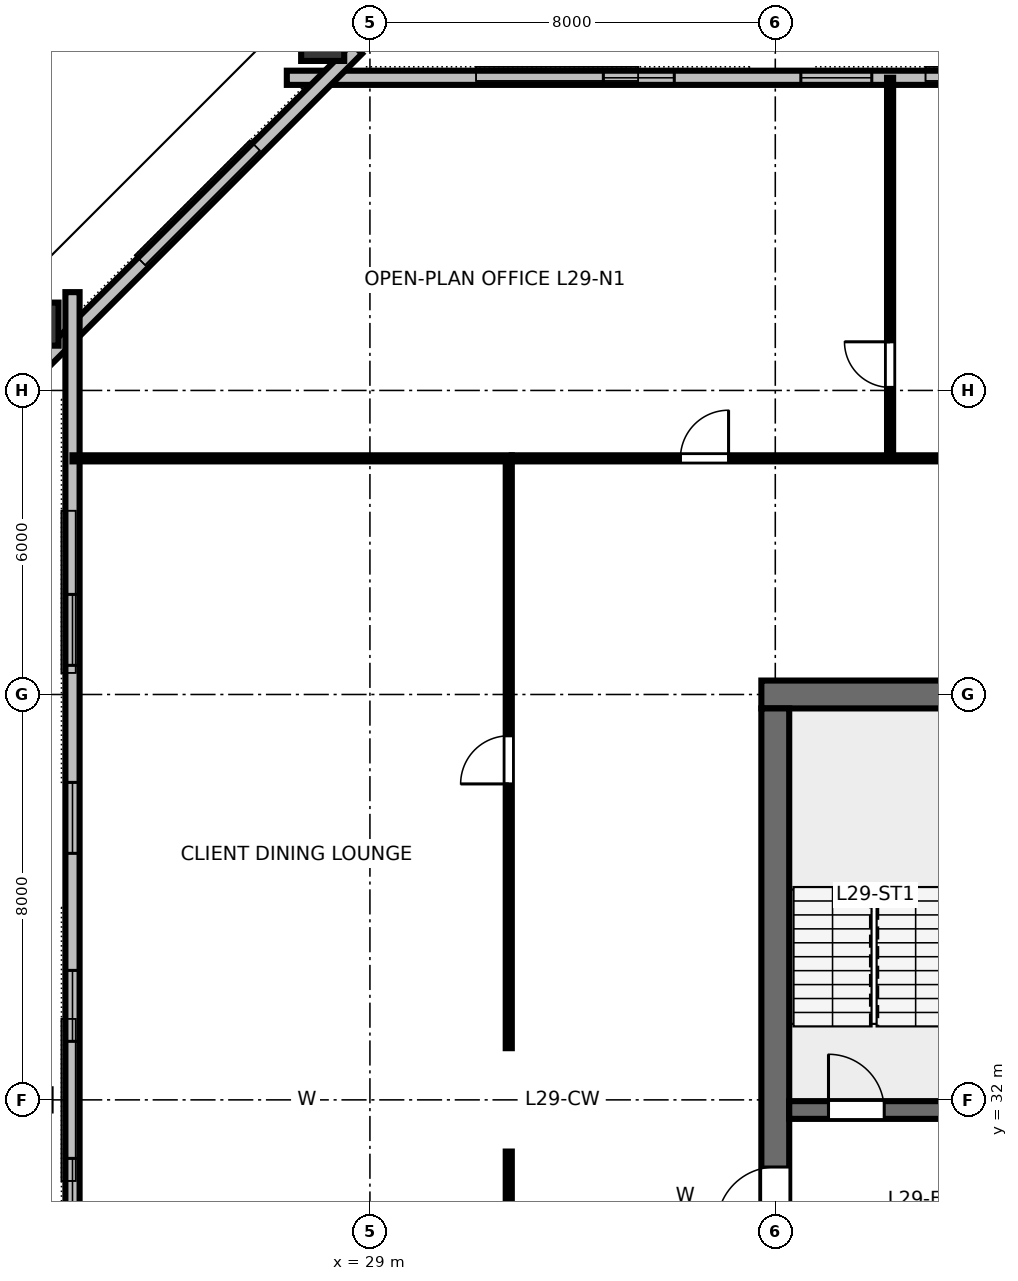
"""IFC4 building model, lengths in metres.
Left out: names, types, materials, properties, quantities, classifications, styles, units other than length and angle.
Written with IfcOpenShell. Run it as: python <this file> out.ifc"""

import sys

from ifc_helpers import new_model, si_unit, direction, frame, frame_2d, origin, origin_2d, place, context, subcontext, project, spatial, rectangle, hollow_rectangle, i_section, extrude, element, fill, save


model = new_model("IFC4")
c1 = context("Model", 3, precision=1e-05, world=origin(), true_north=direction((0.0, 1.0)))
c2 = subcontext(c1, "Body", "Model", "MODEL_VIEW")
j1 = project(units=[si_unit("LENGTHUNIT", "METRE"), si_unit("PLANEANGLEUNIT", "RADIAN")], contexts=[c1])
p1 = place(None, origin())
s1 = spatial("IfcSite", under=j1, at=p1, CompositionType="ELEMENT")
p2 = place(p1, origin())
s2 = spatial("IfcBuilding", under=s1, at=p2, CompositionType="ELEMENT")
p3 = place(p2, frame((0.0, 0.0, 113.2)))
s3 = spatial("IfcBuildingStorey", under=s2, at=p3, CompositionType="ELEMENT", Elevation=113.2)
p4 = place(p3, frame((36.725, 40.0, 0.0), z_axis=(0.0, 0.0, 1.0), x_axis=(1.0, 0.0, 0.0)))
e1 = element("IfcWall", 1, at=p4, inside=s3, PredefinedType="SHEAR", context=c2, shape_type="SweptSolid", body=[
    extrude(rectangle(XDim=18.55, YDim=0.55, at=frame_2d((9.275, 0.0))), origin(), (0.0, 0.0, 1.0), 3.36),
])
p5 = place(p4, frame((10.575, 0.0, 0.0)))
e2 = element("IfcOpeningElement", 2, at=p5, cuts=e1, PredefinedType="OPENING", context=c2, shape_type="SweptSolid", body=[
    extrude(rectangle(XDim=1.0, YDim=2.15, at=frame_2d((0.5, 1.075))), frame((0.0, 0.285, 0.0), z_axis=(0.0, -1.0, 0.0), x_axis=(1.0, 0.0, 0.0)), (0.0, 0.0, 1.0), 0.57),
])
p6 = place(p3, frame((37.0, 24.275, 0.0), z_axis=(0.0, 0.0, 1.0), x_axis=(0.0, 1.0, 0.0)))
e3 = element("IfcWall", 3, at=p6, inside=s3, PredefinedType="SHEAR", context=c2, shape_type="SweptSolid", body=[
    extrude(rectangle(XDim=15.45, YDim=0.55, at=frame_2d((7.725, 0.0))), origin(), (0.0, 0.0, 1.0), 3.36),
])
p7 = place(p6, frame((5.25, 0.0, 0.0)))
e4 = element("IfcOpeningElement", 4, at=p7, cuts=e3, PredefinedType="OPENING", context=c2, shape_type="SweptSolid", body=[
    extrude(rectangle(XDim=1.15, YDim=2.15, at=frame_2d((0.575, 1.075))), frame((0.0, 0.285, 0.0), z_axis=(0.0, -1.0, 0.0), x_axis=(1.0, 0.0, 0.0)), (0.0, 0.0, 1.0), 0.57),
])
p8 = place(p3, frame((37.275, 31.8, 0.0), z_axis=(0.0, 0.0, 1.0), x_axis=(1.0, 0.0, 0.0)))
e5 = element("IfcWall", 5, at=p8, inside=s3, PredefinedType="SHEAR", context=c2, shape_type="SweptSolid", body=[
    extrude(rectangle(XDim=17.45, YDim=0.35, at=frame_2d((8.725, 0.0))), origin(), (0.0, 0.0, 1.0), 3.36),
])
p9 = place(p8, frame((0.775, 0.0, 0.0)))
e6 = element("IfcOpeningElement", 6, at=p9, cuts=e5, PredefinedType="OPENING", context=c2, shape_type="SweptSolid", body=[
    extrude(rectangle(XDim=1.1, YDim=2.15, at=frame_2d((0.55, 1.075))), frame((0.0, 0.185, 0.0), z_axis=(0.0, -1.0, 0.0), x_axis=(1.0, 0.0, 0.0)), (0.0, 0.0, 1.0), 0.37),
])
p10 = place(p8, frame((14.675, 0.0, 0.0)))
e7 = element("IfcOpeningElement", 7, at=p10, cuts=e5, PredefinedType="OPENING", context=c2, shape_type="SweptSolid", body=[
    extrude(rectangle(XDim=1.1, YDim=2.15, at=frame_2d((0.55, 1.075))), frame((0.0, 0.185, 0.0), z_axis=(0.0, -1.0, 0.0), x_axis=(1.0, 0.0, 0.0)), (0.0, 0.0, 1.0), 0.37),
])
p11 = place(p3, frame((28.067, 53.002, 0.0), z_axis=(0.227500403072, -0.158558770333, 0.960782328601), x_axis=(0.571787524267, 0.820401747373, 0.0)))
e8 = element("IfcColumn", 8, at=p11, inside=s3, PredefinedType="COLUMN", context=c2, shape_type="SweptSolid", body=[
    extrude(hollow_rectangle(XDim=0.85, YDim=1.0, WallThickness=0.05, at=origin_2d()), origin(), (0.0, 0.0, 1.0), 3.495),
])
p12 = place(p3, frame((22.354, 47.309, 0.0), z_axis=(0.187078780285, -0.199037835024, 0.961969578623), x_axis=(-0.658831210424, 0.700947149483, 0.273156603076)))
e9 = element("IfcColumn", 9, at=p12, inside=s3, PredefinedType="COLUMN", context=c2, shape_type="SweptSolid", body=[
    extrude(hollow_rectangle(XDim=0.85, YDim=1.0, WallThickness=0.05, at=origin_2d()), origin(), (0.0, 0.0, 1.0), 3.491),
])
p13 = place(p3, frame((22.47, 32.0, 0.0), z_axis=(0.19007295017, 0.0, 0.981769969806), x_axis=(-0.981769969806, 0.0, 0.19007295017)))
e10 = element("IfcColumn", 10, at=p13, inside=s3, PredefinedType="COLUMN", context=c2, shape_type="SweptSolid", body=[
    extrude(i_section(OverallWidth=0.418, OverallDepth=0.455, WebThickness=0.042, FlangeThickness=0.068, FilletRadius=0.025, at=origin_2d()), origin(), (0.0, 0.0, 1.0), 3.42),
])
p14 = place(p3, frame((64.64, 52.17, 0.0), z_axis=(0.0, 0.0, 1.0), x_axis=(-1.0, 0.0, 0.0)))
e11 = element("IfcWall", 11, at=p14, inside=s3, PredefinedType="STANDARD", context=c2, shape_type="SweptSolid", body=[
    extrude(rectangle(XDim=37.28, YDim=0.28, at=frame_2d((18.64, 0.0))), origin(), (0.0, 0.0, 1.0), 2.662),
])
p15 = place(p14, frame((15.347, 0.0, 0.0)))
e12 = element("IfcOpeningElement", 12, at=p15, cuts=e11, PredefinedType="OPENING", context=c2, shape_type="SweptSolid", body=[
    extrude(rectangle(XDim=1.4, YDim=2.15, at=frame_2d((0.7, 1.075))), frame((0.0, 0.15, 0.0), z_axis=(0.0, -1.0, 0.0), x_axis=(1.0, 0.0, 0.0)), (0.0, 0.0, 1.0), 0.3),
])
p16 = place(p14, frame((6.247, 0.0, 0.85)))
e13 = element("IfcOpeningElement", 13, at=p16, cuts=e11, PredefinedType="OPENING", context=c2, shape_type="SweptSolid", body=[
    extrude(rectangle(XDim=1.4, YDim=1.2, at=frame_2d((0.7, 0.6))), frame((0.0, 0.15, 0.0), z_axis=(0.0, -1.0, 0.0), x_axis=(1.0, 0.0, 0.0)), (0.0, 0.0, 1.0), 0.3),
])
p17 = place(p14, frame((21.838, 0.0, 0.85)))
e14 = element("IfcOpeningElement", 14, at=p17, cuts=e11, PredefinedType="OPENING", context=c2, shape_type="SweptSolid", body=[
    extrude(rectangle(XDim=1.4, YDim=1.2, at=frame_2d((0.7, 0.6))), frame((0.0, 0.15, 0.0), z_axis=(0.0, -1.0, 0.0), x_axis=(1.0, 0.0, 0.0)), (0.0, 0.0, 1.0), 0.3),
])
p18 = place(p14, frame((25.736, 0.0, 0.85)))
e15 = element("IfcOpeningElement", 15, at=p18, cuts=e11, PredefinedType="OPENING", context=c2, shape_type="SweptSolid", body=[
    extrude(rectangle(XDim=1.4, YDim=1.2, at=frame_2d((0.7, 0.6))), frame((0.0, 0.15, 0.0), z_axis=(0.0, -1.0, 0.0), x_axis=(1.0, 0.0, 0.0)), (0.0, 0.0, 1.0), 0.3),
])
p19 = place(p14, frame((29.633, 0.0, 0.85)))
e16 = element("IfcOpeningElement", 16, at=p19, cuts=e11, PredefinedType="OPENING", context=c2, shape_type="SweptSolid", body=[
    extrude(rectangle(XDim=1.4, YDim=1.2, at=frame_2d((0.7, 0.6))), frame((0.0, 0.15, 0.0), z_axis=(0.0, -1.0, 0.0), x_axis=(1.0, 0.0, 0.0)), (0.0, 0.0, 1.0), 0.3),
])
p20 = place(p3, frame((28.746, 52.744, 0.0), z_axis=(0.0, 0.0, 1.0), x_axis=(-0.707106781187, -0.707106781187, 0.0)))
e17 = element("IfcWall", 17, at=p20, inside=s3, PredefinedType="STANDARD", context=c2, shape_type="SweptSolid", body=[
    extrude(rectangle(XDim=8.753, YDim=0.28, at=frame_2d((4.376, 0.0))), origin(), (0.0, 0.0, 1.0), 2.662),
])
p21 = place(p3, frame((23.13, 47.94, 0.0), z_axis=(0.0, 0.0, 1.0), x_axis=(0.0, -1.0, 0.0)))
e18 = element("IfcWall", 18, at=p21, inside=s3, PredefinedType="STANDARD", context=c2, shape_type="SweptSolid", body=[
    extrude(rectangle(XDim=31.88, YDim=0.28, at=frame_2d((15.94, 0.0))), origin(), (0.0, 0.0, 1.0), 2.662),
])
p22 = place(p21, frame((5.965, 0.0, 0.85)))
e19 = element("IfcOpeningElement", 19, at=p22, cuts=e18, PredefinedType="OPENING", context=c2, shape_type="SweptSolid", body=[
    extrude(rectangle(XDim=1.4, YDim=1.2, at=frame_2d((0.7, 0.6))), frame((0.0, 0.15, 0.0), z_axis=(0.0, -1.0, 0.0), x_axis=(1.0, 0.0, 0.0)), (0.0, 0.0, 1.0), 0.3),
])
p23 = place(p21, frame((9.675, 0.0, 0.85)))
e20 = element("IfcOpeningElement", 20, at=p23, cuts=e18, PredefinedType="OPENING", context=c2, shape_type="SweptSolid", body=[
    extrude(rectangle(XDim=1.4, YDim=1.2, at=frame_2d((0.7, 0.6))), frame((0.0, 0.15, 0.0), z_axis=(0.0, -1.0, 0.0), x_axis=(1.0, 0.0, 0.0)), (0.0, 0.0, 1.0), 0.3),
])
p24 = place(p21, frame((13.385, 0.0, 0.85)))
e21 = element("IfcOpeningElement", 21, at=p24, cuts=e18, PredefinedType="OPENING", context=c2, shape_type="SweptSolid", body=[
    extrude(rectangle(XDim=1.4, YDim=1.2, at=frame_2d((0.7, 0.6))), frame((0.0, 0.15, 0.0), z_axis=(0.0, -1.0, 0.0), x_axis=(1.0, 0.0, 0.0)), (0.0, 0.0, 1.0), 0.3),
])
p25 = place(p21, frame((17.095, 0.0, 0.85)))
e22 = element("IfcOpeningElement", 22, at=p25, cuts=e18, PredefinedType="OPENING", context=c2, shape_type="SweptSolid", body=[
    extrude(rectangle(XDim=1.4, YDim=1.2, at=frame_2d((0.7, 0.6))), frame((0.0, 0.15, 0.0), z_axis=(0.0, -1.0, 0.0), x_axis=(1.0, 0.0, 0.0)), (0.0, 0.0, 1.0), 0.3),
])
p26 = place(p21, frame((20.805, 0.0, 0.85)))
e23 = element("IfcOpeningElement", 23, at=p26, cuts=e18, PredefinedType="OPENING", context=c2, shape_type="SweptSolid", body=[
    extrude(rectangle(XDim=1.4, YDim=1.2, at=frame_2d((0.7, 0.6))), frame((0.0, 0.15, 0.0), z_axis=(0.0, -1.0, 0.0), x_axis=(1.0, 0.0, 0.0)), (0.0, 0.0, 1.0), 0.3),
])
p27 = place(p21, frame((24.515, 0.0, 0.85)))
e24 = element("IfcOpeningElement", 24, at=p27, cuts=e18, PredefinedType="OPENING", context=c2, shape_type="SweptSolid", body=[
    extrude(rectangle(XDim=1.4, YDim=1.2, at=frame_2d((0.7, 0.6))), frame((0.0, 0.15, 0.0), z_axis=(0.0, -1.0, 0.0), x_axis=(1.0, 0.0, 0.0)), (0.0, 0.0, 1.0), 0.3),
])
p28 = place(p3, frame((39.266, 44.66, 0.0), z_axis=(0.0, 0.0, 1.0), x_axis=(0.0, 1.0, 0.0)))
e25 = element("IfcWall", 25, at=p28, inside=s3, PredefinedType="PARTITIONING", context=c2, shape_type="SweptSolid", body=[
    extrude(rectangle(XDim=7.51, YDim=0.12, at=frame_2d((3.755, 0.0))), origin(), (0.0, 0.0, 1.0), 2.64),
])
p29 = place(p28, frame((1.4, 0.0, 0.0)))
e26 = element("IfcOpeningElement", 26, at=p29, cuts=e25, PredefinedType="OPENING", context=c2, shape_type="SweptSolid", body=[
    extrude(rectangle(XDim=0.9, YDim=2.15, at=frame_2d((0.45, 1.075))), frame((0.0, 0.07, 0.0), z_axis=(0.0, -1.0, 0.0), x_axis=(1.0, 0.0, 0.0)), (0.0, 0.0, 1.0), 0.14),
])
p30 = place(p3, frame((31.8, 44.66, 0.0), z_axis=(0.0, 0.0, 1.0), x_axis=(1.0, 0.0, 0.0)))
e27 = element("IfcWall", 27, at=p30, inside=s3, PredefinedType="PARTITIONING", context=c2, shape_type="SweptSolid", body=[
    extrude(rectangle(XDim=28.4, YDim=0.12, at=frame_2d((14.2, 0.0))), origin(), (0.0, 0.0, 1.0), 2.64),
])
p31 = place(p30, frame((3.328, 0.0, 0.0)))
e28 = element("IfcOpeningElement", 28, at=p31, cuts=e27, PredefinedType="OPENING", context=c2, shape_type="SweptSolid", body=[
    extrude(rectangle(XDim=0.95, YDim=2.15, at=frame_2d((0.475, 1.075))), frame((0.0, 0.07, 0.0), z_axis=(0.0, -1.0, 0.0), x_axis=(1.0, 0.0, 0.0)), (0.0, 0.0, 1.0), 0.14),
])
p32 = place(p30, frame((8.901, 0.0, 0.0)))
e29 = element("IfcOpeningElement", 29, at=p32, cuts=e27, PredefinedType="OPENING", context=c2, shape_type="SweptSolid", body=[
    extrude(rectangle(XDim=0.95, YDim=2.15, at=frame_2d((0.475, 1.075))), frame((0.0, 0.07, 0.0), z_axis=(0.0, -1.0, 0.0), x_axis=(1.0, 0.0, 0.0)), (0.0, 0.0, 1.0), 0.14),
])
p33 = place(p30, frame((14.127, 0.0, 0.0)))
e30 = element("IfcOpeningElement", 30, at=p33, cuts=e27, PredefinedType="OPENING", context=c2, shape_type="SweptSolid", body=[
    extrude(rectangle(XDim=0.95, YDim=2.15, at=frame_2d((0.475, 1.075))), frame((0.0, 0.07, 0.0), z_axis=(0.0, -1.0, 0.0), x_axis=(1.0, 0.0, 0.0)), (0.0, 0.0, 1.0), 0.14),
])
p34 = place(p30, frame((19.537, 0.0, 0.0)))
e31 = element("IfcOpeningElement", 31, at=p34, cuts=e27, PredefinedType="OPENING", context=c2, shape_type="SweptSolid", body=[
    extrude(rectangle(XDim=0.95, YDim=2.15, at=frame_2d((0.475, 1.075))), frame((0.0, 0.07, 0.0), z_axis=(0.0, -1.0, 0.0), x_axis=(1.0, 0.0, 0.0)), (0.0, 0.0, 1.0), 0.14),
])
p35 = place(p30, frame((24.708, 0.0, 0.0)))
e32 = element("IfcOpeningElement", 32, at=p35, cuts=e27, PredefinedType="OPENING", context=c2, shape_type="SweptSolid", body=[
    extrude(rectangle(XDim=0.95, YDim=2.15, at=frame_2d((0.475, 1.075))), frame((0.0, 0.07, 0.0), z_axis=(0.0, -1.0, 0.0), x_axis=(1.0, 0.0, 0.0)), (0.0, 0.0, 1.0), 0.14),
])
p36 = place(p3, frame((31.74, 19.4, 0.0), z_axis=(0.0, 0.0, 1.0), x_axis=(0.0, 1.0, 0.0)))
e33 = element("IfcWall", 33, at=p36, inside=s3, PredefinedType="PARTITIONING", context=c2, shape_type="SweptSolid", body=[
    extrude(rectangle(XDim=11.58, YDim=0.12, at=frame_2d((5.79, 0.0))), origin(), (0.0, 0.0, 1.0), 2.64),
])
p37 = place(p36, frame((5.415, 0.0, 0.0)))
e34 = element("IfcOpeningElement", 34, at=p37, cuts=e33, PredefinedType="OPENING", context=c2, shape_type="SweptSolid", body=[
    extrude(rectangle(XDim=0.95, YDim=2.15, at=frame_2d((0.475, 1.075))), frame((0.0, 0.07, 0.0), z_axis=(0.0, -1.0, 0.0), x_axis=(1.0, 0.0, 0.0)), (0.0, 0.0, 1.0), 0.14),
])
p38 = place(p3, frame((31.74, 33.02, 0.0), z_axis=(0.0, 0.0, 1.0), x_axis=(0.0, 1.0, 0.0)))
e35 = element("IfcWall", 35, at=p38, inside=s3, PredefinedType="PARTITIONING", context=c2, shape_type="SweptSolid", body=[
    extrude(rectangle(XDim=11.58, YDim=0.12, at=frame_2d((5.79, 0.0))), origin(), (0.0, 0.0, 1.0), 2.64),
])
p39 = place(p38, frame((5.215, 0.0, 0.0)))
e36 = element("IfcOpeningElement", 36, at=p39, cuts=e35, PredefinedType="OPENING", context=c2, shape_type="SweptSolid", body=[
    extrude(rectangle(XDim=0.95, YDim=2.15, at=frame_2d((0.475, 1.075))), frame((0.0, 0.07, 0.0), z_axis=(0.0, -1.0, 0.0), x_axis=(1.0, 0.0, 0.0)), (0.0, 0.0, 1.0), 0.14),
])
p40 = place(p3, frame((31.8, 44.66, 0.0), z_axis=(0.0, 0.0, 1.0), x_axis=(-1.0, 0.0, 0.0)))
e37 = element("IfcWall", 37, at=p40, inside=s3, PredefinedType="PARTITIONING", context=c2, shape_type="SweptSolid", body=[
    extrude(rectangle(XDim=8.67, YDim=0.12, at=frame_2d((4.335, 0.0))), origin(), (0.0, 0.0, 1.0), 2.64),
])
p41 = place(p18, origin())
e38 = element("IfcWindow", 38, at=p41, inside=s3, PartitioningType="SINGLE_PANEL", PredefinedType="WINDOW", context=c2, shape_type="SweptSolid", body=[
    extrude(rectangle(XDim=1.4, YDim=1.2, at=frame_2d((0.7, 0.6))), frame((0.0, 0.03, 0.0), z_axis=(0.0, -1.0, 0.0), x_axis=(1.0, 0.0, 0.0)), (0.0, 0.0, 1.0), 0.06),
])
fill(e15, e38)
p42 = place(p19, origin())
e39 = element("IfcWindow", 39, at=p42, inside=s3, PartitioningType="SINGLE_PANEL", PredefinedType="WINDOW", context=c2, shape_type="SweptSolid", body=[
    extrude(rectangle(XDim=1.4, YDim=1.2, at=frame_2d((0.7, 0.6))), frame((0.0, 0.03, 0.0), z_axis=(0.0, -1.0, 0.0), x_axis=(1.0, 0.0, 0.0)), (0.0, 0.0, 1.0), 0.06),
])
fill(e16, e39)
p43 = place(p22, origin())
e40 = element("IfcWindow", 40, at=p43, inside=s3, PartitioningType="SINGLE_PANEL", PredefinedType="WINDOW", context=c2, shape_type="SweptSolid", body=[
    extrude(rectangle(XDim=1.4, YDim=1.2, at=frame_2d((0.7, 0.6))), frame((0.0, 0.03, 0.0), z_axis=(0.0, -1.0, 0.0), x_axis=(1.0, 0.0, 0.0)), (0.0, 0.0, 1.0), 0.06),
])
fill(e19, e40)
p44 = place(p23, origin())
e41 = element("IfcWindow", 41, at=p44, inside=s3, PartitioningType="SINGLE_PANEL", PredefinedType="WINDOW", context=c2, shape_type="SweptSolid", body=[
    extrude(rectangle(XDim=1.4, YDim=1.2, at=frame_2d((0.7, 0.6))), frame((0.0, 0.03, 0.0), z_axis=(0.0, -1.0, 0.0), x_axis=(1.0, 0.0, 0.0)), (0.0, 0.0, 1.0), 0.06),
])
fill(e20, e41)
p45 = place(p24, origin())
e42 = element("IfcWindow", 42, at=p45, inside=s3, PartitioningType="SINGLE_PANEL", PredefinedType="WINDOW", context=c2, shape_type="SweptSolid", body=[
    extrude(rectangle(XDim=1.4, YDim=1.2, at=frame_2d((0.7, 0.6))), frame((0.0, 0.03, 0.0), z_axis=(0.0, -1.0, 0.0), x_axis=(1.0, 0.0, 0.0)), (0.0, 0.0, 1.0), 0.06),
])
fill(e21, e42)
p46 = place(p25, origin())
e43 = element("IfcWindow", 43, at=p46, inside=s3, PartitioningType="SINGLE_PANEL", PredefinedType="WINDOW", context=c2, shape_type="SweptSolid", body=[
    extrude(rectangle(XDim=1.4, YDim=1.2, at=frame_2d((0.7, 0.6))), frame((0.0, 0.03, 0.0), z_axis=(0.0, -1.0, 0.0), x_axis=(1.0, 0.0, 0.0)), (0.0, 0.0, 1.0), 0.06),
])
fill(e22, e43)
p47 = place(p9, origin())
e44 = element("IfcDoor", 44, at=p47, inside=s3, OperationType="SINGLE_SWING_LEFT", PredefinedType="DOOR", context=c2, shape_type="SweptSolid", body=[
    extrude(rectangle(XDim=1.1, YDim=2.15, at=frame_2d((0.55, 1.075))), frame((0.0, 0.025, 0.0), z_axis=(0.0, -1.0, 0.0), x_axis=(1.0, 0.0, 0.0)), (0.0, 0.0, 1.0), 0.05),
])
fill(e6, e44)
p48 = place(p7, origin())
e45 = element("IfcDoor", 45, at=p48, inside=s3, OperationType="SINGLE_SWING_LEFT", PredefinedType="DOOR", context=c2, shape_type="SweptSolid", body=[
    extrude(rectangle(XDim=1.15, YDim=2.15, at=frame_2d((0.575, 1.075))), frame((0.0, 0.025, 0.0), z_axis=(0.0, -1.0, 0.0), x_axis=(1.0, 0.0, 0.0)), (0.0, 0.0, 1.0), 0.05),
])
fill(e4, e45)
p49 = place(p29, origin())
e46 = element("IfcDoor", 46, at=p49, inside=s3, OperationType="SINGLE_SWING_RIGHT", PredefinedType="DOOR", context=c2, shape_type="SweptSolid", body=[
    extrude(rectangle(XDim=0.9, YDim=2.15, at=frame_2d((0.45, 1.075))), frame((0.0, 0.025, 0.0), z_axis=(0.0, -1.0, 0.0), x_axis=(1.0, 0.0, 0.0)), (0.0, 0.0, 1.0), 0.05),
])
fill(e26, e46)
p50 = place(p31, origin())
e47 = element("IfcDoor", 47, at=p50, inside=s3, OperationType="SINGLE_SWING_RIGHT", PredefinedType="DOOR", context=c2, shape_type="SweptSolid", body=[
    extrude(rectangle(XDim=0.95, YDim=2.15, at=frame_2d((0.475, 1.075))), frame((0.0, 0.025, 0.0), z_axis=(0.0, -1.0, 0.0), x_axis=(1.0, 0.0, 0.0)), (0.0, 0.0, 1.0), 0.05),
])
fill(e28, e47)
p51 = place(p39, origin())
e48 = element("IfcDoor", 48, at=p51, inside=s3, OperationType="SINGLE_SWING_LEFT", PredefinedType="DOOR", context=c2, shape_type="SweptSolid", body=[
    extrude(rectangle(XDim=0.95, YDim=2.15, at=frame_2d((0.475, 1.075))), frame((0.0, 0.025, 0.0), z_axis=(0.0, -1.0, 0.0), x_axis=(1.0, 0.0, 0.0)), (0.0, 0.0, 1.0), 0.05),
])
fill(e36, e48)
save(model, sys.argv[1])
